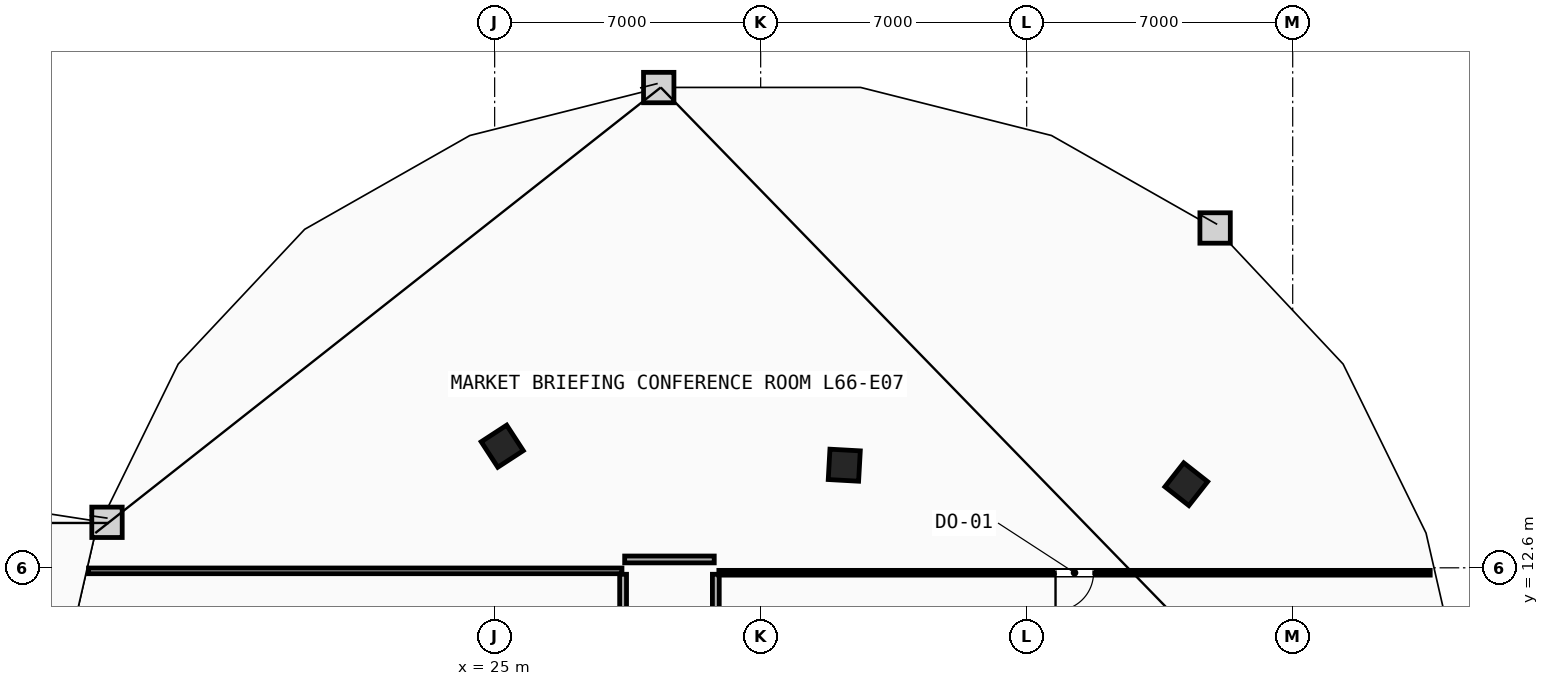
"""IFC4 building model, lengths in metres.
Left out: names, types, materials, properties, quantities, classifications, styles, units other than length and angle.
Written with IfcOpenShell. Run it as: python <this file> out.ifc"""

import sys

from ifc_helpers import new_model, si_unit, direction, frame, frame_2d, origin, origin_2d, place, context, subcontext, project, spatial, rectangle, extrude, element, fill, save


model = new_model("IFC4")
c1 = context("Model", 3, precision=1e-05, world=origin(), true_north=direction((0.0, 1.0)))
c2 = subcontext(c1, "Body", "Model", "MODEL_VIEW")
j1 = project(units=[si_unit("LENGTHUNIT", "METRE"), si_unit("PLANEANGLEUNIT", "RADIAN")], contexts=[c1])
p1 = place(None, origin())
s1 = spatial("IfcSite", under=j1, at=p1, CompositionType="ELEMENT")
p2 = place(p1, origin())
s2 = spatial("IfcBuilding", under=s1, at=p2, CompositionType="ELEMENT")
p3 = place(p2, frame((0.0, 0.0, 250.4)))
s3 = spatial("IfcBuildingStorey", under=s2, at=p3, CompositionType="ELEMENT", Elevation=250.4)
for number, where, z_axis, x_axis in (
    (1, (43.2, 14.8, 0.0), (0.0, 0.0, 1.0), (-0.786, 0.618, 0.0)),
    (2, (34.2, 15.3, 0.0), (0.0, 0.0, 1.0), (-0.998, 0.055, 0.0)),
    (3, (25.2, 15.8, 0.0), (0.0, 0.0, 1.0), (-0.838, -0.546, 0.0)),
):
    element("IfcColumn", number, at=place(p3, frame(where, z_axis=z_axis, x_axis=x_axis)), inside=s3, PredefinedType="COLUMN", context=c2, shape_type="SweptSolid", body=[
        extrude(rectangle(XDim=0.8, YDim=0.8, at=origin_2d()), origin(), (0.0, 0.0, 1.0), 3.6),
    ])
p4 = place(p3, frame((14.314, 12.52, 0.0), z_axis=(0.0, 0.0, 1.0), x_axis=(1.0, 0.0, 0.0)))
e4 = element("IfcWall", 4, at=p4, inside=s3, PredefinedType="PARTITIONING", context=c2, shape_type="SweptSolid", body=[
    extrude(rectangle(XDim=14.036, YDim=0.15, at=frame_2d((7.018, 0.0))), origin(), (0.0, 0.0, 1.0), 3.34),
])
p5 = place(p3, frame((28.38, 12.43, 0.0), z_axis=(0.0, 0.0, 1.0), x_axis=(0.0, -1.0, 0.0)))
e5 = element("IfcWall", 5, at=p5, inside=s3, PredefinedType="PARTITIONING", context=c2, shape_type="SweptSolid", body=[
    extrude(rectangle(XDim=6.36, YDim=0.18, at=frame_2d((3.18, 0.0))), origin(), (0.0, 0.0, 1.0), 3.34),
])
p6 = place(p5, frame((2.68, 0.0, 0.0)))
e6 = element("IfcOpeningElement", 6, at=p6, cuts=e5, PredefinedType="OPENING", context=c2, shape_type="SweptSolid", body=[
    extrude(rectangle(XDim=1.0, YDim=2.15, at=frame_2d((0.5, 1.075))), frame((0.0, 0.1, 0.0), z_axis=(0.0, -1.0, 0.0), x_axis=(1.0, 0.0, 0.0)), (0.0, 0.0, 1.0), 0.2),
])
p7 = place(p3, frame((30.82, 6.07, 0.0), z_axis=(0.0, 0.0, 1.0), x_axis=(0.0, 1.0, 0.0)))
e7 = element("IfcWall", 7, at=p7, inside=s3, PredefinedType="PARTITIONING", context=c2, shape_type="SweptSolid", body=[
    extrude(rectangle(XDim=6.36, YDim=0.18, at=frame_2d((3.18, 0.0))), origin(), (0.0, 0.0, 1.0), 3.34),
])
p8 = place(p7, frame((2.68, 0.0, 0.0)))
e8 = element("IfcOpeningElement", 8, at=p8, cuts=e7, PredefinedType="OPENING", context=c2, shape_type="SweptSolid", body=[
    extrude(rectangle(XDim=1.0, YDim=2.15, at=frame_2d((0.5, 1.075))), frame((0.0, 0.1, 0.0), z_axis=(0.0, -1.0, 0.0), x_axis=(1.0, 0.0, 0.0)), (0.0, 0.0, 1.0), 0.2),
])
p9 = place(p3, frame((30.779, 12.82, 0.0), z_axis=(0.0, 0.0, 1.0), x_axis=(-1.0, 0.0, 0.0)))
e9 = element("IfcWall", 9, at=p9, inside=s3, PredefinedType="PARTITIONING", context=c2, shape_type="SweptSolid", body=[
    extrude(rectangle(XDim=2.357, YDim=0.18, at=frame_2d((1.179, 0.0))), origin(), (0.0, 0.0, 1.0), 3.34),
])
p10 = place(p3, frame((49.619, 12.47, 0.0), z_axis=(0.0, 0.0, 1.0), x_axis=(-1.0, 0.0, 0.0)))
e10 = element("IfcWall", 10, at=p10, inside=s3, PredefinedType="PARTITIONING", context=c2, shape_type="SweptSolid", body=[
    extrude(rectangle(XDim=18.719, YDim=0.125, at=frame_2d((9.359, 0.0))), origin(), (0.0, 0.0, 1.0), 3.34),
])
p11 = place(p10, frame((8.859, 0.0, 0.0)))
e11 = element("IfcOpeningElement", 11, at=p11, cuts=e10, PredefinedType="OPENING", context=c2, shape_type="SweptSolid", body=[
    extrude(rectangle(XDim=1.0, YDim=2.15, at=frame_2d((0.5, 1.075))), frame((0.0, 0.073, 0.0), z_axis=(0.0, -1.0, 0.0), x_axis=(1.0, 0.0, 0.0)), (0.0, 0.0, 1.0), 0.145),
])
p12 = place(p11, origin())
e12 = element("IfcDoor", 12, at=p12, inside=s3, OperationType="SINGLE_SWING_RIGHT", PredefinedType="DOOR", context=c2, shape_type="SweptSolid", body=[
    extrude(rectangle(XDim=1.0, YDim=2.15, at=frame_2d((0.5, 1.075))), frame((0.0, 0.025, 0.0), z_axis=(0.0, -1.0, 0.0), x_axis=(1.0, 0.0, 0.0)), (0.0, 0.0, 1.0), 0.05),
])
fill(e11, e12)
save(model, sys.argv[1])
